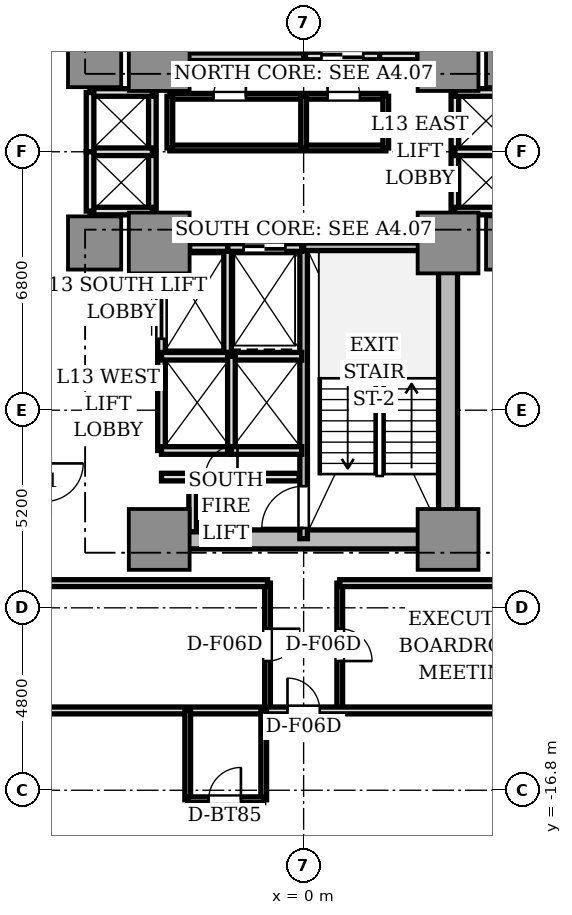
"""IFC4 building model, lengths in metres.
Left out: names, types, materials, properties, quantities, classifications, styles, units other than length and angle.
Written with IfcOpenShell. Run it as: python <this file> out.ifc"""

import sys

from ifc_helpers import new_model, si_unit, direction, frame, frame_2d, origin, origin_2d, place, context, subcontext, project, spatial, rectangle, extrude, source, transform, mapped, element, fill, save


model = new_model("IFC4")
c1 = context("Model", 3, precision=1e-05, world=origin(), true_north=direction((0.0, 1.0)))
c2 = subcontext(c1, "Body", "Model", "MODEL_VIEW")
j1 = project(units=[si_unit("LENGTHUNIT", "METRE"), si_unit("PLANEANGLEUNIT", "RADIAN")], contexts=[c1])
p1 = place(None, origin())
s1 = spatial("IfcSite", under=j1, at=p1, CompositionType="ELEMENT")
p2 = place(p1, origin())
s2 = spatial("IfcBuilding", under=s1, at=p2, CompositionType="ELEMENT")
p3 = place(p2, frame((0.0, 0.0, 51.05)))
s3 = spatial("IfcBuildingStorey", under=s2, at=p3, CompositionType="ELEMENT", Elevation=51.05)
p4 = place(p3, frame((-3.55, -10.2, 0.0), z_axis=(0.0, 0.0, 1.0), x_axis=(1.0, 0.0, 0.0)))
e1 = element("IfcWall", 1, at=p4, inside=s3, PredefinedType="SHEAR", context=c2, shape_type="SweptSolid", body=[
    extrude(rectangle(XDim=7.1, YDim=0.5, at=frame_2d((3.55, 0.0))), origin(), (0.0, 0.0, 1.0), 3.11),
])
p5 = place(p3, frame((3.8, -9.75, 0.0), z_axis=(0.0, 0.0, 1.0), x_axis=(0.0, 1.0, 0.0)))
e2 = element("IfcWall", 2, at=p5, inside=s3, PredefinedType="SHEAR", context=c2, shape_type="SweptSolid", body=[
    extrude(rectangle(XDim=6.9, YDim=0.5, at=frame_2d((3.45, 0.0))), origin(), (0.0, 0.0, 1.0), 3.11),
])
m1 = source(origin(), c2, "Body", "SweptSolid", [
    extrude(rectangle(XDim=1.6, YDim=1.6, at=origin_2d()), origin(), (0.0, 0.0, 1.0), 3.11),
])
for number, where, z_axis, x_axis in (
    (3, (-3.8, 2.4, 0.0), (0.0, 0.0, 1.0), (1.0, 0.0, 0.0)),
    (4, (3.8, 2.4, 0.0), (0.0, 0.0, 1.0), (1.0, 0.0, 0.0)),
    (5, (-3.8, -2.4, 0.0), (0.0, 0.0, 1.0), (1.0, 0.0, 0.0)),
    (6, (3.8, -2.4, 0.0), (0.0, 0.0, 1.0), (1.0, 0.0, 0.0)),
    (7, (-3.8, -10.2, 0.0), (0.0, 0.0, 1.0), (1.0, 0.0, 0.0)),
    (8, (3.8, -10.2, 0.0), (0.0, 0.0, 1.0), (1.0, 0.0, 0.0)),
):
    element("IfcColumn", number, at=place(p3, frame(where, z_axis=z_axis, x_axis=x_axis)), inside=s3, PredefinedType="COLUMN", context=c2, shape_type="MappedRepresentation", body=[
        mapped(m1, transform((0.0, 0.0, 0.0), scale=1.0)),
    ])
m2 = source(origin(), c2, "Body", "SweptSolid", [
    extrude(rectangle(XDim=1.4, YDim=1.4, at=origin_2d()), origin(), (0.0, 0.0, 1.0), 3.11),
])
for number, where, z_axis, x_axis in (
    (9, (5.5, 2.4, 0.0), (0.0, 0.0, 1.0), (1.0, 0.0, 0.0)),
    (10, (-5.5, 2.4, 0.0), (0.0, 0.0, 1.0), (1.0, 0.0, 0.0)),
    (11, (5.5, -2.4, 0.0), (0.0, 0.0, 1.0), (1.0, 0.0, 0.0)),
    (12, (-5.5, -2.4, 0.0), (0.0, 0.0, 1.0), (1.0, 0.0, 0.0)),
):
    element("IfcColumn", number, at=place(p3, frame(where, z_axis=z_axis, x_axis=x_axis)), inside=s3, PredefinedType="COLUMN", context=c2, shape_type="MappedRepresentation", body=[
        mapped(m2, transform((0.0, 0.0, 0.0), scale=1.0)),
    ])
p6 = place(p3, frame((0.0, 2.5, 0.0), z_axis=(0.0, 0.0, 1.0), x_axis=(0.0, 1.0, 0.0)))
e13 = element("IfcWall", 13, at=p6, inside=s3, PredefinedType="SOLIDWALL", context=c2, shape_type="SweptSolid", body=[
    extrude(rectangle(XDim=7.68, YDim=0.2, at=frame_2d((3.84, 0.0))), origin(), (0.0, 0.0, 1.0), 3.11),
])
p7 = place(p6, frame((6.5, 0.0, 0.0)))
e14 = element("IfcOpeningElement", 14, at=p7, cuts=e13, PredefinedType="OPENING", context=c2, shape_type="SweptSolid", body=[
    extrude(rectangle(XDim=0.95, YDim=2.15, at=frame_2d((0.475, 1.075))), frame((0.0, 0.11, 0.0), z_axis=(0.0, -1.0, 0.0), x_axis=(1.0, 0.0, 0.0)), (0.0, 0.0, 1.0), 0.22),
])
p8 = place(p3, frame((-3.72, 2.5, 0.0), z_axis=(0.0, 0.0, 1.0), x_axis=(1.0, 0.0, 0.0)))
e15 = element("IfcWall", 15, at=p8, inside=s3, PredefinedType="SOLIDWALL", context=c2, shape_type="SweptSolid", body=[
    extrude(rectangle(XDim=3.72, YDim=0.2, at=frame_2d((1.86, 0.0))), origin(), (0.0, 0.0, 1.0), 3.11),
])
p9 = place(p3, frame((0.0, -10.18, 0.0), z_axis=(0.0, 0.0, 1.0), x_axis=(0.0, 1.0, 0.0)))
e16 = element("IfcWall", 16, at=p9, inside=s3, PredefinedType="SOLIDWALL", context=c2, shape_type="SweptSolid", body=[
    extrude(rectangle(XDim=7.68, YDim=0.2, at=frame_2d((3.84, 0.0))), origin(), (0.0, 0.0, 1.0), 3.11),
])
p10 = place(p9, frame((0.28, 0.0, 0.0)))
e17 = element("IfcOpeningElement", 17, at=p10, cuts=e16, PredefinedType="OPENING", context=c2, shape_type="SweptSolid", body=[
    extrude(rectangle(XDim=1.1, YDim=2.15, at=frame_2d((0.55, 1.075))), frame((0.0, 0.11, 0.0), z_axis=(0.0, -1.0, 0.0), x_axis=(1.0, 0.0, 0.0)), (0.0, 0.0, 1.0), 0.22),
])
p11 = place(p3, frame((0.0, -2.5, 0.0), z_axis=(0.0, 0.0, 1.0), x_axis=(1.0, 0.0, 0.0)))
e18 = element("IfcWall", 18, at=p11, inside=s3, PredefinedType="SOLIDWALL", context=c2, shape_type="SweptSolid", body=[
    extrude(rectangle(XDim=3.72, YDim=0.2, at=frame_2d((1.86, 0.0))), origin(), (0.0, 0.0, 1.0), 3.11),
])
p12 = place(p3, frame((2.0, 2.5, 0.0), z_axis=(0.0, 0.0, 1.0), x_axis=(0.0, 1.0, 0.0)))
e19 = element("IfcWall", 19, at=p12, inside=s3, PredefinedType="SOLIDWALL", context=c2, shape_type="SweptSolid", body=[
    extrude(rectangle(XDim=2.78, YDim=0.2, at=frame_2d((1.39, 0.0))), origin(), (0.0, 0.0, 1.0), 2.66),
])
p13 = place(p3, frame((0.05, 2.52, 0.0), z_axis=(0.0, 0.0, 1.0), x_axis=(1.0, 0.0, 0.0)))
e20 = element("IfcWall", 20, at=p13, inside=s3, PredefinedType="SOLIDWALL", context=c2, shape_type="SweptSolid", body=[
    extrude(rectangle(XDim=1.95, YDim=0.2, at=frame_2d((0.975, 0.0))), origin(), (0.0, 0.0, 1.0), 2.66),
])
p14 = place(p13, frame((0.42, 0.0, 0.0)))
e21 = element("IfcOpeningElement", 21, at=p14, cuts=e20, PredefinedType="OPENING", context=c2, shape_type="SweptSolid", body=[
    extrude(rectangle(XDim=1.1, YDim=2.2, at=frame_2d((0.55, 1.1))), frame((0.0, 0.11, 0.0), z_axis=(0.0, -1.0, 0.0), x_axis=(1.0, 0.0, 0.0)), (0.0, 0.0, 1.0), 0.22),
])
p15 = place(p3, frame((-2.0, -5.28, 0.0), z_axis=(0.0, 0.0, 1.0), x_axis=(0.0, 1.0, 0.0)))
e22 = element("IfcWall", 22, at=p15, inside=s3, PredefinedType="SOLIDWALL", context=c2, shape_type="SweptSolid", body=[
    extrude(rectangle(XDim=2.78, YDim=0.2, at=frame_2d((1.39, 0.0))), origin(), (0.0, 0.0, 1.0), 2.66),
])
p16 = place(p3, frame((-2.0, -2.52, 0.0), z_axis=(0.0, 0.0, 1.0), x_axis=(1.0, 0.0, 0.0)))
e23 = element("IfcWall", 23, at=p16, inside=s3, PredefinedType="SOLIDWALL", context=c2, shape_type="SweptSolid", body=[
    extrude(rectangle(XDim=1.95, YDim=0.2, at=frame_2d((0.975, 0.0))), origin(), (0.0, 0.0, 1.0), 2.66),
])
p17 = place(p16, frame((0.42, 0.0, 0.0)))
e24 = element("IfcOpeningElement", 24, at=p17, cuts=e23, PredefinedType="OPENING", context=c2, shape_type="SweptSolid", body=[
    extrude(rectangle(XDim=1.1, YDim=2.2, at=frame_2d((0.55, 1.1))), frame((0.0, 0.11, 0.0), z_axis=(0.0, -1.0, 0.0), x_axis=(1.0, 0.0, 0.0)), (0.0, 0.0, 1.0), 0.22),
])
for number, where, z_axis, x_axis in (
    (25, (2.0, 2.52, 0.0), (0.0, 0.0, 1.0), (1.0, 0.0, 0.0)),
    (26, (-3.0, -2.52, 0.0), (0.0, 0.0, 1.0), (1.0, 0.0, 0.0)),
):
    element("IfcWall", number, at=place(p3, frame(where, z_axis=z_axis, x_axis=x_axis)), inside=s3, PredefinedType="SOLIDWALL", context=c2, shape_type="SweptSolid", body=[
        extrude(rectangle(XDim=1.0, YDim=0.2, at=frame_2d((0.5, 0.0))), origin(), (0.0, 0.0, 1.0), 2.66),
    ])
p18 = place(p3, frame((-3.74, -5.36, 0.0), z_axis=(0.0, 0.0, 1.0), x_axis=(0.0, 1.0, 0.0)))
e27 = element("IfcWall", 27, at=p18, inside=s3, PredefinedType="SOLIDWALL", context=c2, shape_type="SweptSolid", body=[
    extrude(rectangle(XDim=2.08, YDim=0.2, at=frame_2d((1.04, 0.0))), origin(), (0.0, 0.0, 1.0), 2.66),
])
p19 = place(p18, frame((0.44, 0.0, 0.0)))
e28 = element("IfcOpeningElement", 28, at=p19, cuts=e27, PredefinedType="OPENING", context=c2, shape_type="SweptSolid", body=[
    extrude(rectangle(XDim=1.2, YDim=2.2, at=frame_2d((0.6, 1.1))), frame((0.0, 0.11, 0.0), z_axis=(0.0, -1.0, 0.0), x_axis=(1.0, 0.0, 0.0)), (0.0, 0.0, 1.0), 0.22),
])
p20 = place(p3, frame((-3.74, -7.86, 0.0), z_axis=(0.0, 0.0, 1.0), x_axis=(0.0, 1.0, 0.0)))
e29 = element("IfcWall", 29, at=p20, inside=s3, PredefinedType="SOLIDWALL", context=c2, shape_type="SweptSolid", body=[
    extrude(rectangle(XDim=2.48, YDim=0.2, at=frame_2d((1.24, 0.0))), origin(), (0.0, 0.0, 1.0), 2.66),
])
p21 = place(p3, frame((-3.74, -7.86, 0.0), z_axis=(0.0, 0.0, 1.0), x_axis=(1.0, 0.0, 0.0)))
e30 = element("IfcWall", 30, at=p21, inside=s3, PredefinedType="SOLIDWALL", context=c2, shape_type="SweptSolid", body=[
    extrude(rectangle(XDim=1.84, YDim=0.2, at=frame_2d((0.92, 0.0))), origin(), (0.0, 0.0, 1.0), 2.66),
])
p22 = place(p3, frame((-3.74, -5.38, 0.0), z_axis=(0.0, 0.0, 1.0), x_axis=(1.0, 0.0, 0.0)))
e31 = element("IfcWall", 31, at=p22, inside=s3, PredefinedType="SOLIDWALL", context=c2, shape_type="SweptSolid", body=[
    extrude(rectangle(XDim=3.69, YDim=0.2, at=frame_2d((1.845, 0.0))), origin(), (0.0, 0.0, 1.0), 2.66),
])
p23 = place(p3, frame((-1.9, -7.86, 0.0), z_axis=(0.0, 0.0, 1.0), x_axis=(0.0, 1.0, 0.0)))
e32 = element("IfcWall", 32, at=p23, inside=s3, PredefinedType="SOLIDWALL", context=c2, shape_type="SweptSolid", body=[
    extrude(rectangle(XDim=2.48, YDim=0.2, at=frame_2d((1.24, 0.0))), origin(), (0.0, 0.0, 1.0), 2.66),
])
p24 = place(p3, frame((-1.9, -7.86, 0.0), z_axis=(0.0, 0.0, 1.0), x_axis=(1.0, 0.0, 0.0)))
e33 = element("IfcWall", 33, at=p24, inside=s3, PredefinedType="SOLIDWALL", context=c2, shape_type="SweptSolid", body=[
    extrude(rectangle(XDim=1.85, YDim=0.2, at=frame_2d((0.925, 0.0))), origin(), (0.0, 0.0, 1.0), 2.66),
])
p25 = place(p3, frame((3.98, -1.56, 0.0), z_axis=(0.0, 0.0, 1.0), x_axis=(0.0, 1.0, 0.0)))
e34 = element("IfcWall", 34, at=p25, inside=s3, PredefinedType="SOLIDWALL", context=c2, shape_type="SweptSolid", body=[
    extrude(rectangle(XDim=3.12, YDim=0.2, at=frame_2d((1.56, 0.0))), origin(), (0.0, 0.0, 1.0), 2.18),
])
for number, where, z_axis, x_axis in (
    (35, (3.98, 1.56, 0.0), (0.0, 0.0, 1.0), (1.0, 0.0, 0.0)),
    (36, (3.98, -1.56, 0.0), (0.0, 0.0, 1.0), (1.0, 0.0, 0.0)),
    (37, (3.98, 0.0, 0.0), (0.0, 0.0, 1.0), (1.0, 0.0, 0.0)),
):
    element("IfcWall", number, at=place(p3, frame(where, z_axis=z_axis, x_axis=x_axis)), inside=s3, PredefinedType="SOLIDWALL", context=c2, shape_type="SweptSolid", body=[
        extrude(rectangle(XDim=1.64, YDim=0.2, at=frame_2d((0.82, 0.0))), origin(), (0.0, 0.0, 1.0), 2.66),
    ])
p26 = place(p3, frame((-3.98, -1.56, 0.0), z_axis=(0.0, 0.0, 1.0), x_axis=(0.0, 1.0, 0.0)))
e38 = element("IfcWall", 38, at=p26, inside=s3, PredefinedType="SOLIDWALL", context=c2, shape_type="SweptSolid", body=[
    extrude(rectangle(XDim=3.12, YDim=0.2, at=frame_2d((1.56, 0.0))), origin(), (0.0, 0.0, 1.0), 2.18),
])
for number, where, z_axis, x_axis in (
    (39, (-5.62, 1.56, 0.0), (0.0, 0.0, 1.0), (1.0, 0.0, 0.0)),
    (40, (-5.62, -1.56, 0.0), (0.0, 0.0, 1.0), (1.0, 0.0, 0.0)),
    (41, (-5.62, 0.0, 0.0), (0.0, 0.0, 1.0), (1.0, 0.0, 0.0)),
):
    element("IfcWall", number, at=place(p3, frame(where, z_axis=z_axis, x_axis=x_axis)), inside=s3, PredefinedType="SOLIDWALL", context=c2, shape_type="SweptSolid", body=[
        extrude(rectangle(XDim=1.64, YDim=0.2, at=frame_2d((0.82, 0.0))), origin(), (0.0, 0.0, 1.0), 2.66),
    ])
for number, where, z_axis, x_axis in (
    (42, (-5.62, 0.0, 0.0), (0.0, 0.0, 1.0), (0.0, 1.0, 0.0)),
    (43, (-5.62, -1.56, 0.0), (0.0, 0.0, 1.0), (0.0, 1.0, 0.0)),
):
    element("IfcWall", number, at=place(p3, frame(where, z_axis=z_axis, x_axis=x_axis)), inside=s3, PredefinedType="SOLIDWALL", context=c2, shape_type="SweptSolid", body=[
        extrude(rectangle(XDim=1.56, YDim=0.2, at=frame_2d((0.78, 0.0))), origin(), (0.0, 0.0, 1.0), 2.66),
    ])
p27 = place(p3, frame((-3.74, -8.56, 0.0), z_axis=(0.0, 0.0, 1.0), x_axis=(1.0, 0.0, 0.0)))
e44 = element("IfcWall", 44, at=p27, inside=s3, PredefinedType="SOLIDWALL", context=c2, shape_type="SweptSolid", body=[
    extrude(rectangle(XDim=3.62, YDim=0.2, at=frame_2d((1.81, 0.0))), origin(), (0.0, 0.0, 1.0), 2.66),
])
p28 = place(p27, frame((1.15, 0.0, 0.0)))
e45 = element("IfcOpeningElement", 45, at=p28, cuts=e44, PredefinedType="OPENING", context=c2, shape_type="SweptSolid", body=[
    extrude(rectangle(XDim=0.85, YDim=2.1, at=frame_2d((0.425, 1.05))), frame((0.0, 0.11, 0.0), z_axis=(0.0, -1.0, 0.0), x_axis=(1.0, 0.0, 0.0)), (0.0, 0.0, 1.0), 0.22),
])
p29 = place(p3, frame((-2.92, -10.0, 0.0), z_axis=(0.0, 0.0, 1.0), x_axis=(0.0, 1.0, 0.0)))
e46 = element("IfcWall", 46, at=p29, inside=s3, PredefinedType="SOLIDWALL", context=c2, shape_type="SweptSolid", body=[
    extrude(rectangle(XDim=1.44, YDim=0.2, at=frame_2d((0.72, 0.0))), origin(), (0.0, 0.0, 1.0), 2.66),
])
p30 = place(p3, frame((-3.52, 0.1, 0.0), z_axis=(0.0, 0.0, 1.0), x_axis=(1.0, 0.0, 0.0)))
e47 = element("IfcWall", 47, at=p30, inside=s3, PredefinedType="PARTITIONING", context=c2, shape_type="SweptSolid", body=[
    extrude(rectangle(XDim=5.68, YDim=0.15, at=frame_2d((2.84, 0.0))), origin(), (0.0, 0.0, 1.0), 2.66),
])
p31 = place(p3, frame((-3.52, 1.46, 0.0), z_axis=(0.0, 0.0, 1.0), x_axis=(1.0, 0.0, 0.0)))
e48 = element("IfcWall", 48, at=p31, inside=s3, PredefinedType="PARTITIONING", context=c2, shape_type="SweptSolid", body=[
    extrude(rectangle(XDim=5.68, YDim=0.15, at=frame_2d((2.84, 0.0))), origin(), (0.0, 0.0, 1.0), 2.66),
])
p32 = place(p31, frame((1.15, 0.0, 0.0)))
e49 = element("IfcOpeningElement", 49, at=p32, cuts=e48, PredefinedType="OPENING", context=c2, shape_type="SweptSolid", body=[
    extrude(rectangle(XDim=0.85, YDim=2.1, at=frame_2d((0.425, 1.05))), frame((0.0, 0.085, 0.0), z_axis=(0.0, -1.0, 0.0), x_axis=(1.0, 0.0, 0.0)), (0.0, 0.0, 1.0), 0.17),
])
p33 = place(p31, frame((4.15, 0.0, 0.0)))
e50 = element("IfcOpeningElement", 50, at=p33, cuts=e48, PredefinedType="OPENING", context=c2, shape_type="SweptSolid", body=[
    extrude(rectangle(XDim=0.85, YDim=2.1, at=frame_2d((0.425, 1.05))), frame((0.0, 0.085, 0.0), z_axis=(0.0, -1.0, 0.0), x_axis=(1.0, 0.0, 0.0)), (0.0, 0.0, 1.0), 0.17),
])
p34 = place(p3, frame((-3.52, 0.1, 0.0), z_axis=(0.0, 0.0, 1.0), x_axis=(0.0, 1.0, 0.0)))
e51 = element("IfcWall", 51, at=p34, inside=s3, PredefinedType="PARTITIONING", context=c2, shape_type="SweptSolid", body=[
    extrude(rectangle(XDim=1.36, YDim=0.15, at=frame_2d((0.68, 0.0))), origin(), (0.0, 0.0, 1.0), 2.18),
])
for number, where, z_axis, x_axis in (
    (52, (2.16, 0.1, 0.0), (0.0, 0.0, 1.0), (0.0, 1.0, 0.0)),
    (53, (0.0, 0.1, 0.0), (0.0, 0.0, 1.0), (0.0, 1.0, 0.0)),
):
    element("IfcWall", number, at=place(p3, frame(where, z_axis=z_axis, x_axis=x_axis)), inside=s3, PredefinedType="PARTITIONING", context=c2, shape_type="SweptSolid", body=[
        extrude(rectangle(XDim=1.36, YDim=0.15, at=frame_2d((0.68, 0.0))), origin(), (0.0, 0.0, 1.0), 2.66),
    ])
p35 = place(p3, frame((0.95, -11.35, 0.0), z_axis=(0.0, 0.0, 1.0), x_axis=(0.0, -1.0, 0.0)))
e54 = element("IfcWall", 54, at=p35, inside=s3, PredefinedType="PARTITIONING", context=c2, shape_type="SweptSolid", body=[
    extrude(rectangle(XDim=3.35, YDim=0.15, at=frame_2d((1.675, 0.0))), origin(), (0.0, 0.0, 1.0), 2.66),
])
p36 = place(p35, frame((1.2, 0.0, 0.0)))
e55 = element("IfcOpeningElement", 55, at=p36, cuts=e54, PredefinedType="OPENING", context=c2, shape_type="SweptSolid", body=[
    extrude(rectangle(XDim=0.85, YDim=2.1, at=frame_2d((0.425, 1.05))), frame((0.0, 0.085, 0.0), z_axis=(0.0, -1.0, 0.0), x_axis=(1.0, 0.0, 0.0)), (0.0, 0.0, 1.0), 0.17),
])
p37 = place(p3, frame((-0.95, -11.35, 0.0), z_axis=(0.0, 0.0, 1.0), x_axis=(0.0, -1.0, 0.0)))
e56 = element("IfcWall", 56, at=p37, inside=s3, PredefinedType="PARTITIONING", context=c2, shape_type="SweptSolid", body=[
    extrude(rectangle(XDim=3.35, YDim=0.15, at=frame_2d((1.675, 0.0))), origin(), (0.0, 0.0, 1.0), 2.66),
])
p38 = place(p37, frame((1.2, 0.0, 0.0)))
e57 = element("IfcOpeningElement", 57, at=p38, cuts=e56, PredefinedType="OPENING", context=c2, shape_type="SweptSolid", body=[
    extrude(rectangle(XDim=0.85, YDim=2.1, at=frame_2d((0.425, 1.05))), frame((0.0, 0.085, 0.0), z_axis=(0.0, -1.0, 0.0), x_axis=(1.0, 0.0, 0.0)), (0.0, 0.0, 1.0), 0.17),
])
for number, where, z_axis, x_axis in (
    (58, (0.95, -11.35, 0.0), (0.0, 0.0, 1.0), (1.0, 0.0, 0.0)),
    (59, (-6.75, -11.35, 0.0), (0.0, 0.0, 1.0), (1.0, 0.0, 0.0)),
):
    element("IfcWall", number, at=place(p3, frame(where, z_axis=z_axis, x_axis=x_axis)), inside=s3, PredefinedType="PARTITIONING", context=c2, shape_type="SweptSolid", body=[
        extrude(rectangle(XDim=5.8, YDim=0.18, at=frame_2d((2.9, 0.0))), origin(), (0.0, 0.0, 1.0), 2.66),
    ])
p39 = place(p3, frame((-6.75, -14.7, 0.0), z_axis=(0.0, 0.0, 1.0), x_axis=(1.0, 0.0, 0.0)))
e60 = element("IfcWall", 60, at=p39, inside=s3, PredefinedType="PARTITIONING", context=c2, shape_type="SweptSolid", body=[
    extrude(rectangle(XDim=13.5, YDim=0.18, at=frame_2d((6.75, 0.0))), origin(), (0.0, 0.0, 1.0), 2.66),
])
p40 = place(p39, frame((6.325, 0.0, 0.0)))
e61 = element("IfcOpeningElement", 61, at=p40, cuts=e60, PredefinedType="OPENING", context=c2, shape_type="SweptSolid", body=[
    extrude(rectangle(XDim=0.85, YDim=2.1, at=frame_2d((0.425, 1.05))), frame((0.0, 0.1, 0.0), z_axis=(0.0, -1.0, 0.0), x_axis=(1.0, 0.0, 0.0)), (0.0, 0.0, 1.0), 0.2),
])
for number, where, z_axis, x_axis in (
    (62, (-1.05, -14.7, 0.0), (0.0, 0.0, 1.0), (0.0, -1.0, 0.0)),
    (63, (-3.05, -14.7, 0.0), (0.0, 0.0, 1.0), (0.0, -1.0, 0.0)),
):
    element("IfcWall", number, at=place(p3, frame(where, z_axis=z_axis, x_axis=x_axis)), inside=s3, PredefinedType="PARTITIONING", context=c2, shape_type="SweptSolid", body=[
        extrude(rectangle(XDim=2.35, YDim=0.15, at=frame_2d((1.175, 0.0))), origin(), (0.0, 0.0, 1.0), 2.66),
    ])
p41 = place(p3, frame((-3.05, -17.05, 0.0), z_axis=(0.0, 0.0, 1.0), x_axis=(1.0, 0.0, 0.0)))
e64 = element("IfcWall", 64, at=p41, inside=s3, PredefinedType="PARTITIONING", context=c2, shape_type="SweptSolid", body=[
    extrude(rectangle(XDim=2.0, YDim=0.15, at=frame_2d((1.0, 0.0))), origin(), (0.0, 0.0, 1.0), 2.66),
])
p42 = place(p41, frame((0.55, 0.0, 0.0)))
e65 = element("IfcOpeningElement", 65, at=p42, cuts=e64, PredefinedType="OPENING", context=c2, shape_type="SweptSolid", body=[
    extrude(rectangle(XDim=0.85, YDim=2.1, at=frame_2d((0.425, 1.05))), frame((0.0, 0.085, 0.0), z_axis=(0.0, -1.0, 0.0), x_axis=(1.0, 0.0, 0.0)), (0.0, 0.0, 1.0), 0.17),
])
m3 = source(origin(), c2, "Body", "SweptSolid", [
    extrude(rectangle(XDim=1.1, YDim=0.05, at=origin_2d()), origin(), (0.0, 0.0, 1.0), 2.2),
])
p43 = place(p14, frame((0.55, 0.0, 0.0)))
e66 = element("IfcDoor", 66, at=p43, inside=s3, OperationType="DOUBLE_DOOR_SLIDING", PredefinedType="DOOR", context=c2, shape_type="MappedRepresentation", body=[
    mapped(m3, transform((0.0, 0.0, 0.0), scale=1.0)),
])
fill(e21, e66)
p44 = place(p17, frame((0.55, 0.0, 0.0)))
e67 = element("IfcDoor", 67, at=p44, inside=s3, OperationType="DOUBLE_DOOR_SLIDING", PredefinedType="DOOR", context=c2, shape_type="MappedRepresentation", body=[
    mapped(m3, transform((0.0, 0.0, 0.0), scale=1.0)),
])
fill(e24, e67)
m4 = source(origin(), c2, "Body", "SweptSolid", [
    extrude(rectangle(XDim=1.2, YDim=0.05, at=origin_2d()), origin(), (0.0, 0.0, 1.0), 2.2),
])
p45 = place(p19, frame((0.6, 0.0, 0.0)))
e68 = element("IfcDoor", 68, at=p45, inside=s3, OperationType="DOUBLE_DOOR_SLIDING", PredefinedType="DOOR", context=c2, shape_type="MappedRepresentation", body=[
    mapped(m4, transform((0.0, 0.0, 0.0), scale=1.0)),
])
fill(e28, e68)
m5 = source(origin(), c2, "Body", "SweptSolid", [
    extrude(rectangle(XDim=1.1, YDim=0.05, at=origin_2d()), origin(), (0.0, 0.0, 1.0), 2.15),
])
p46 = place(p10, frame((0.55, 0.0, 0.0)))
e69 = element("IfcDoor", 69, at=p46, inside=s3, OperationType="SINGLE_SWING_LEFT", PredefinedType="DOOR", context=c2, shape_type="MappedRepresentation", body=[
    mapped(m5, transform((0.0, 0.0, 0.0), scale=1.0)),
])
fill(e17, e69)
m6 = source(origin(), c2, "Body", "SweptSolid", [
    extrude(rectangle(XDim=0.85, YDim=0.05, at=origin_2d()), origin(), (0.0, 0.0, 1.0), 2.1),
])
p47 = place(p28, frame((0.425, 0.0, 0.0)))
e70 = element("IfcDoor", 70, at=p47, inside=s3, OperationType="SINGLE_SWING_RIGHT", PredefinedType="DOOR", context=c2, shape_type="MappedRepresentation", body=[
    mapped(m6, transform((0.0, 0.0, 0.0), scale=1.0)),
])
fill(e45, e70)
p48 = place(p32, frame((0.425, 0.0, 0.0)))
e71 = element("IfcDoor", 71, at=p48, inside=s3, OperationType="SINGLE_SWING_RIGHT", PredefinedType="DOOR", context=c2, shape_type="MappedRepresentation", body=[
    mapped(m6, transform((0.0, 0.0, 0.0), scale=1.0)),
])
fill(e49, e71)
p49 = place(p33, frame((0.425, 0.0, 0.0)))
e72 = element("IfcDoor", 72, at=p49, inside=s3, OperationType="SINGLE_SWING_LEFT", PredefinedType="DOOR", context=c2, shape_type="MappedRepresentation", body=[
    mapped(m6, transform((0.0, 0.0, 0.0), scale=1.0)),
])
fill(e50, e72)
p50 = place(p36, frame((0.425, 0.0, 0.0)))
e73 = element("IfcDoor", 73, at=p50, inside=s3, OperationType="SINGLE_SWING_RIGHT", PredefinedType="DOOR", context=c2, shape_type="MappedRepresentation", body=[
    mapped(m6, transform((0.0, 0.0, 0.0), scale=1.0)),
])
fill(e55, e73)
p51 = place(p38, frame((0.425, 0.0, 0.0)))
e74 = element("IfcDoor", 74, at=p51, inside=s3, OperationType="SINGLE_SWING_LEFT", PredefinedType="DOOR", context=c2, shape_type="MappedRepresentation", body=[
    mapped(m6, transform((0.0, 0.0, 0.0), scale=1.0)),
])
fill(e57, e74)
p52 = place(p42, frame((0.425, 0.0, 0.0)))
e75 = element("IfcDoor", 75, at=p52, inside=s3, OperationType="SINGLE_SWING_RIGHT", PredefinedType="DOOR", context=c2, shape_type="MappedRepresentation", body=[
    mapped(m6, transform((0.0, 0.0, 0.0), scale=1.0)),
])
fill(e65, e75)
p53 = place(p40, frame((0.425, 0.0, 0.0)))
e76 = element("IfcDoor", 76, at=p53, inside=s3, OperationType="SINGLE_SWING_LEFT", PredefinedType="DOOR", context=c2, shape_type="MappedRepresentation", body=[
    mapped(m6, transform((0.0, 0.0, 0.0), scale=1.0)),
])
fill(e61, e76)
save(model, sys.argv[1])
